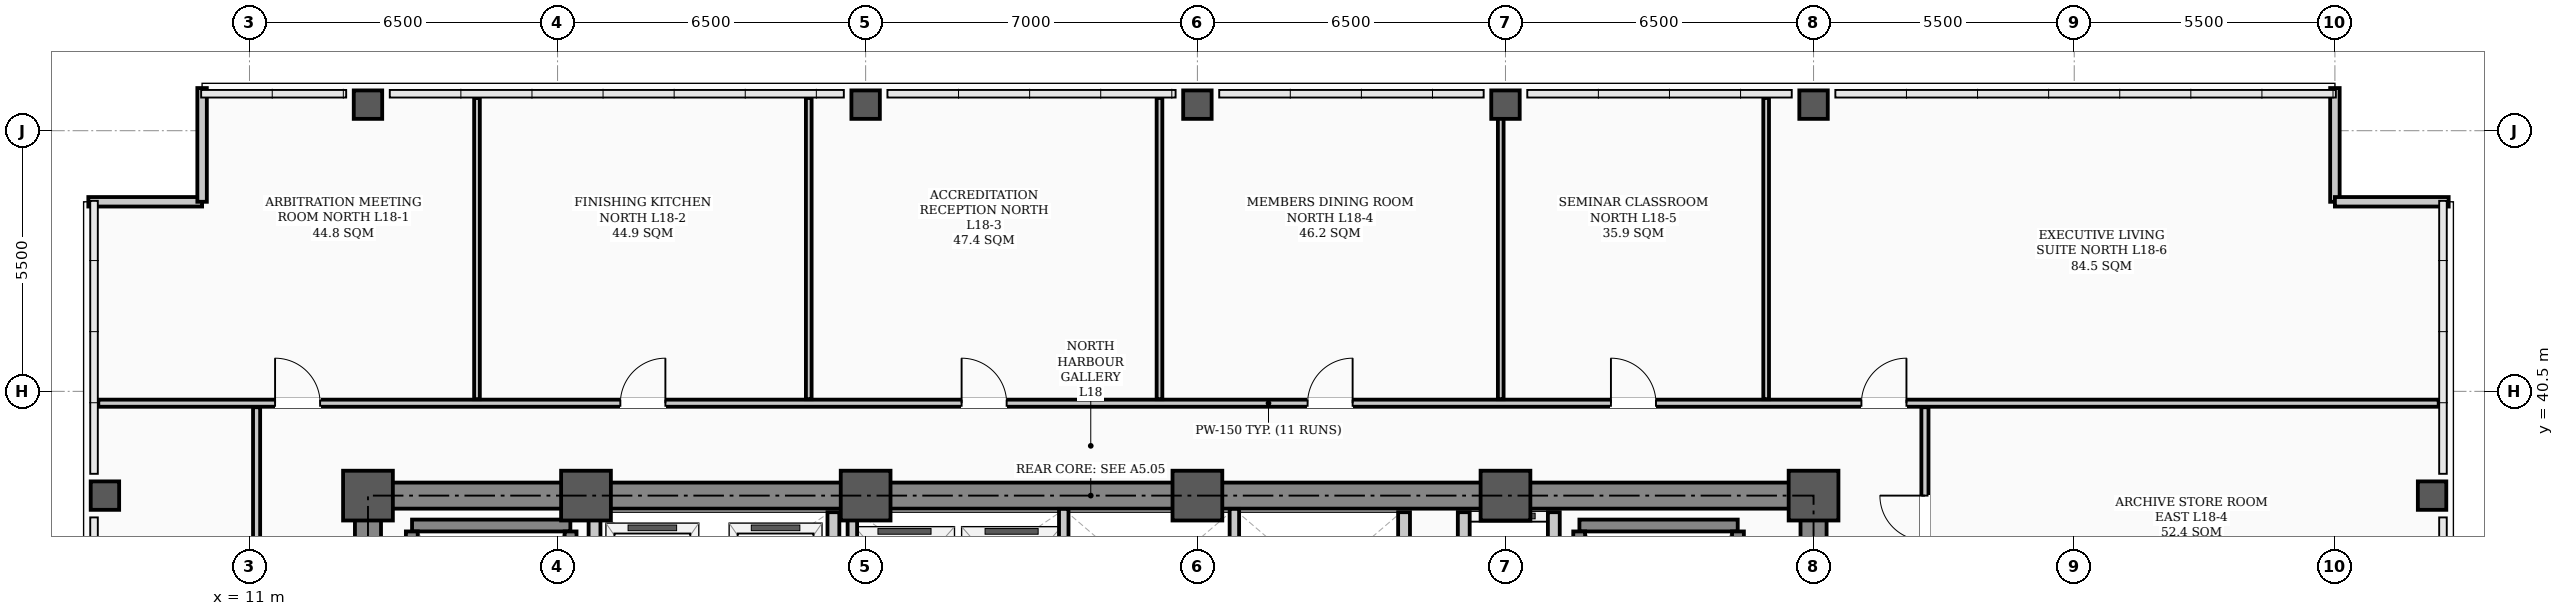
"""IFC4 building model, lengths in metres.
Left out: names, types, materials, properties, quantities, classifications, styles, units other than length and angle.
Written with IfcOpenShell. Run it as: python <this file> out.ifc"""

import sys

from ifc_helpers import new_model, si_unit, direction, frame, frame_2d, origin, origin_2d, place, context, subcontext, project, spatial, rectangle, hollow_rectangle, extrude, element, fill, save


model = new_model("IFC4")
c1 = context("Model", 3, precision=1e-05, world=origin(), true_north=direction((0.0, 1.0)))
c2 = subcontext(c1, "Body", "Model", "MODEL_VIEW")
j1 = project(units=[si_unit("LENGTHUNIT", "METRE"), si_unit("PLANEANGLEUNIT", "RADIAN")], contexts=[c1])
p1 = place(None, origin())
s1 = spatial("IfcSite", under=j1, at=p1, CompositionType="ELEMENT")
p2 = place(p1, origin())
s2 = spatial("IfcBuilding", under=s1, at=p2, CompositionType="ELEMENT")
p3 = place(p2, frame((0.0, 0.0, 73.3)))
s3 = spatial("IfcBuildingStorey", under=s2, at=p3, CompositionType="ELEMENT", Elevation=73.3)
for number, where, z_axis, x_axis in (
    (1, (13.5, 38.3, 0.0), (0.0, 0.0, 1.0), (1.0, 0.0, 0.0)),
    (2, (18.1, 38.3, 0.0), (0.0, 0.0, 1.0), (1.0, 0.0, 0.0)),
    (3, (24.0, 38.3, 0.0), (0.0, 0.0, 1.0), (1.0, 0.0, 0.0)),
    (4, (31.0, 38.3, 0.0), (0.0, 0.0, 1.0), (1.0, 0.0, 0.0)),
    (5, (37.5, 38.3, 0.0), (0.0, 0.0, 1.0), (1.0, 0.0, 0.0)),
    (6, (44.0, 38.3, 0.0), (0.0, 0.0, 1.0), (1.0, 0.0, 0.0)),
):
    element("IfcColumn", number, at=place(p3, frame(where, z_axis=z_axis, x_axis=x_axis)), inside=s3, PredefinedType="COLUMN", context=c2, shape_type="SweptSolid", body=[
        extrude(hollow_rectangle(XDim=1.05, YDim=1.05, WallThickness=0.038, InnerFilletRadius=0.019, OuterFilletRadius=0.057, at=origin_2d()), origin(), (0.0, 0.0, 1.0), 3.9),
    ])
for number, where, z_axis, x_axis in (
    (7, (7.95, 38.3, 0.0), (0.0, 0.0, 1.0), (1.0, 0.0, 0.0)),
    (8, (13.5, 46.55, 0.0), (0.0, 0.0, 1.0), (1.0, 0.0, 0.0)),
    (9, (24.0, 46.55, 0.0), (0.0, 0.0, 1.0), (1.0, 0.0, 0.0)),
    (10, (31.0, 46.55, 0.0), (0.0, 0.0, 1.0), (1.0, 0.0, 0.0)),
    (11, (37.5, 46.55, 0.0), (0.0, 0.0, 1.0), (1.0, 0.0, 0.0)),
    (12, (44.0, 46.55, 0.0), (0.0, 0.0, 1.0), (1.0, 0.0, 0.0)),
    (13, (57.05, 38.3, 0.0), (0.0, 0.0, 1.0), (1.0, 0.0, 0.0)),
):
    element("IfcColumn", number, at=place(p3, frame(where, z_axis=z_axis, x_axis=x_axis)), inside=s3, PredefinedType="COLUMN", context=c2, shape_type="SweptSolid", body=[
        extrude(hollow_rectangle(XDim=0.6, YDim=0.6, WallThickness=0.026, InnerFilletRadius=0.013, OuterFilletRadius=0.039, at=origin_2d()), origin(), (0.0, 0.0, 1.0), 3.9),
    ])
for number, where, z_axis, x_axis in (
    (14, (7.6, 44.5, 0.0), (0.0, 0.0, 1.0), (1.0, 0.0, 0.0)),
    (15, (10.0, 44.5, 0.0), (0.0, 0.0, 1.0), (0.0, 1.0, 0.0)),
    (16, (55.0, 46.9, 0.0), (0.0, 0.0, 1.0), (0.0, -1.0, 0.0)),
    (17, (55.0, 44.5, 0.0), (0.0, 0.0, 1.0), (1.0, 0.0, 0.0)),
):
    element("IfcWall", number, at=place(p3, frame(where, z_axis=z_axis, x_axis=x_axis)), inside=s3, PredefinedType="PARAPET", context=c2, shape_type="SweptSolid", body=[
        extrude(rectangle(XDim=2.4, YDim=0.2, at=frame_2d((1.2, 0.0))), origin(), (0.0, 0.0, 1.0), 1.2),
    ])
p4 = place(p3, frame((13.5, 38.3, 0.0), z_axis=(0.0, 0.0, 1.0), x_axis=(1.0, 0.0, 0.0)))
e18 = element("IfcWall", 18, at=p4, inside=s3, PredefinedType="SHEAR", context=c2, shape_type="SweptSolid", body=[
    extrude(rectangle(XDim=30.5, YDim=0.55, at=frame_2d((15.25, 0.0))), origin(), (0.0, 0.0, 1.0), 3.72),
])
for number, where, z_axis, x_axis in (
    (19, (13.5, 29.35, 0.0), (0.0, 0.0, 1.0), (0.0, 1.0, 0.0)),
    (20, (44.0, 29.35, 0.0), (0.0, 0.0, 1.0), (0.0, 1.0, 0.0)),
):
    element("IfcWall", number, at=place(p3, frame(where, z_axis=z_axis, x_axis=x_axis)), inside=s3, PredefinedType="SHEAR", context=c2, shape_type="SweptSolid", body=[
        extrude(rectangle(XDim=8.6, YDim=0.55, at=frame_2d((4.3, 0.0))), origin(), (0.0, 0.0, 1.0), 3.72),
    ])
p5 = place(p3, frame((14.43, 37.669, 0.0), z_axis=(0.0, 0.0, 1.0), x_axis=(1.0, 0.0, 0.0)))
e21 = element("IfcWall", 21, at=p5, inside=s3, PredefinedType="STANDARD", context=c2, shape_type="SweptSolid", body=[
    extrude(rectangle(XDim=3.34, YDim=0.25, at=frame_2d((1.67, 0.0))), origin(), (0.0, 0.0, 1.0), 3.72),
])
for number, where, z_axis, x_axis in (
    (22, (14.425, 30.36, 0.0), (0.0, 0.0, 1.0), (0.0, 1.0, 0.0)),
    (23, (17.775, 30.36, 0.0), (0.0, 0.0, 1.0), (0.0, 1.0, 0.0)),
):
    element("IfcWall", number, at=place(p3, frame(where, z_axis=z_axis, x_axis=x_axis)), inside=s3, PredefinedType="STANDARD", context=c2, shape_type="SweptSolid", body=[
        extrude(rectangle(XDim=7.184, YDim=0.25, at=frame_2d((3.592, 0.0))), origin(), (0.0, 0.0, 1.0), 3.72),
    ])
p6 = place(p3, frame((39.06, 37.669, 0.0), z_axis=(0.0, 0.0, 1.0), x_axis=(1.0, 0.0, 0.0)))
e24 = element("IfcWall", 24, at=p6, inside=s3, PredefinedType="STANDARD", context=c2, shape_type="SweptSolid", body=[
    extrude(rectangle(XDim=3.34, YDim=0.25, at=frame_2d((1.67, 0.0))), origin(), (0.0, 0.0, 1.0), 3.72),
])
for number, where, z_axis, x_axis in (
    (25, (39.055, 30.36, 0.0), (0.0, 0.0, 1.0), (0.0, 1.0, 0.0)),
    (26, (42.405, 30.36, 0.0), (0.0, 0.0, 1.0), (0.0, 1.0, 0.0)),
):
    element("IfcWall", number, at=place(p3, frame(where, z_axis=z_axis, x_axis=x_axis)), inside=s3, PredefinedType="STANDARD", context=c2, shape_type="SweptSolid", body=[
        extrude(rectangle(XDim=7.184, YDim=0.25, at=frame_2d((3.592, 0.0))), origin(), (0.0, 0.0, 1.0), 3.72),
    ])
p7 = place(p3, frame((36.62, 31.95, 0.0), z_axis=(0.0, 0.0, 1.0), x_axis=(0.0, 1.0, 0.0)))
e27 = element("IfcWall", 27, at=p7, inside=s3, PredefinedType="STANDARD", context=c2, shape_type="SweptSolid", body=[
    extrude(rectangle(XDim=6.0, YDim=0.25, at=frame_2d((3.0, 0.0))), origin(), (0.0, 0.0, 1.0), 3.3),
])
p8 = place(p7, frame((0.9, 0.0, 0.0)))
e28 = element("IfcOpeningElement", 28, at=p8, cuts=e27, PredefinedType="OPENING", context=c2, shape_type="SweptSolid", body=[
    extrude(rectangle(XDim=1.1, YDim=2.08, at=frame_2d((0.55, 1.04))), frame((0.0, 0.135, 0.0), z_axis=(0.0, -1.0, 0.0), x_axis=(1.0, 0.0, 0.0)), (0.0, 0.0, 1.0), 0.27),
])
p9 = place(p7, frame((4.0, 0.0, 0.0)))
e29 = element("IfcOpeningElement", 29, at=p9, cuts=e27, PredefinedType="OPENING", context=c2, shape_type="SweptSolid", body=[
    extrude(rectangle(XDim=1.1, YDim=2.08, at=frame_2d((0.55, 1.04))), frame((0.0, 0.135, 0.0), z_axis=(0.0, -1.0, 0.0), x_axis=(1.0, 0.0, 0.0)), (0.0, 0.0, 1.0), 0.27),
])
p10 = place(p3, frame((38.52, 31.95, 0.0), z_axis=(0.0, 0.0, 1.0), x_axis=(0.0, 1.0, 0.0)))
e30 = element("IfcWall", 30, at=p10, inside=s3, PredefinedType="STANDARD", context=c2, shape_type="SweptSolid", body=[
    extrude(rectangle(XDim=6.0, YDim=0.25, at=frame_2d((3.0, 0.0))), origin(), (0.0, 0.0, 1.0), 3.3),
])
for number, where, z_axis, x_axis in (
    (31, (18.28, 34.62, 0.0), (0.0, 0.0, 1.0), (0.0, 1.0, 0.0)),
    (32, (23.32, 34.62, 0.0), (0.0, 0.0, 1.0), (0.0, 1.0, 0.0)),
):
    element("IfcWall", number, at=place(p3, frame(where, z_axis=z_axis, x_axis=x_axis)), inside=s3, PredefinedType="STANDARD", context=c2, shape_type="SweptSolid", body=[
        extrude(rectangle(XDim=3.33, YDim=0.25, at=frame_2d((1.665, 0.0))), origin(), (0.0, 0.0, 1.0), 3.3),
    ])
p11 = place(p3, frame((35.36, 34.9, 0.0), z_axis=(0.0, 0.0, 1.0), x_axis=(0.0, 1.0, 0.0)))
e33 = element("IfcWall", 33, at=p11, inside=s3, PredefinedType="STANDARD", context=c2, shape_type="SweptSolid", body=[
    extrude(rectangle(XDim=3.05, YDim=0.25, at=frame_2d((1.525, 0.0))), origin(), (0.0, 0.0, 1.0), 3.3),
])
p12 = place(p3, frame((7.81, 40.25, 0.0), z_axis=(0.0, 0.0, 1.0), x_axis=(1.0, 0.0, 0.0)))
e34 = element("IfcWall", 34, at=p12, inside=s3, PredefinedType="PARTITIONING", context=c2, shape_type="SweptSolid", body=[
    extrude(rectangle(XDim=49.38, YDim=0.15, at=frame_2d((24.69, 0.0))), origin(), (0.0, 0.0, 1.0), 3.1),
])
p13 = place(p12, frame((3.73, 0.0, 0.0)))
e35 = element("IfcOpeningElement", 35, at=p13, cuts=e34, PredefinedType="OPENING", context=c2, shape_type="SweptSolid", body=[
    extrude(rectangle(XDim=0.95, YDim=2.08, at=frame_2d((0.475, 1.04))), frame((0.0, 0.085, 0.0), z_axis=(0.0, -1.0, 0.0), x_axis=(1.0, 0.0, 0.0)), (0.0, 0.0, 1.0), 0.17),
])
p14 = place(p12, frame((11.015, 0.0, 0.0)))
e36 = element("IfcOpeningElement", 36, at=p14, cuts=e34, PredefinedType="OPENING", context=c2, shape_type="SweptSolid", body=[
    extrude(rectangle(XDim=0.95, YDim=2.08, at=frame_2d((0.475, 1.04))), frame((0.0, 0.085, 0.0), z_axis=(0.0, -1.0, 0.0), x_axis=(1.0, 0.0, 0.0)), (0.0, 0.0, 1.0), 0.17),
])
p15 = place(p12, frame((18.215, 0.0, 0.0)))
e37 = element("IfcOpeningElement", 37, at=p15, cuts=e34, PredefinedType="OPENING", context=c2, shape_type="SweptSolid", body=[
    extrude(rectangle(XDim=0.95, YDim=2.08, at=frame_2d((0.475, 1.04))), frame((0.0, 0.085, 0.0), z_axis=(0.0, -1.0, 0.0), x_axis=(1.0, 0.0, 0.0)), (0.0, 0.0, 1.0), 0.17),
])
p16 = place(p12, frame((25.515, 0.0, 0.0)))
e38 = element("IfcOpeningElement", 38, at=p16, cuts=e34, PredefinedType="OPENING", context=c2, shape_type="SweptSolid", body=[
    extrude(rectangle(XDim=0.95, YDim=2.08, at=frame_2d((0.475, 1.04))), frame((0.0, 0.085, 0.0), z_axis=(0.0, -1.0, 0.0), x_axis=(1.0, 0.0, 0.0)), (0.0, 0.0, 1.0), 0.17),
])
p17 = place(p12, frame((31.915, 0.0, 0.0)))
e39 = element("IfcOpeningElement", 39, at=p17, cuts=e34, PredefinedType="OPENING", context=c2, shape_type="SweptSolid", body=[
    extrude(rectangle(XDim=0.95, YDim=2.08, at=frame_2d((0.475, 1.04))), frame((0.0, 0.085, 0.0), z_axis=(0.0, -1.0, 0.0), x_axis=(1.0, 0.0, 0.0)), (0.0, 0.0, 1.0), 0.17),
])
p18 = place(p12, frame((37.2, 0.0, 0.0)))
e40 = element("IfcOpeningElement", 40, at=p18, cuts=e34, PredefinedType="OPENING", context=c2, shape_type="SweptSolid", body=[
    extrude(rectangle(XDim=0.95, YDim=2.08, at=frame_2d((0.475, 1.04))), frame((0.0, 0.085, 0.0), z_axis=(0.0, -1.0, 0.0), x_axis=(1.0, 0.0, 0.0)), (0.0, 0.0, 1.0), 0.17),
])
p19 = place(p3, frame((11.15, 17.635, 0.0), z_axis=(0.0, 0.0, 1.0), x_axis=(0.0, 1.0, 0.0)))
e41 = element("IfcWall", 41, at=p19, inside=s3, PredefinedType="PARTITIONING", context=c2, shape_type="SweptSolid", body=[
    extrude(rectangle(XDim=22.53, YDim=0.15, at=frame_2d((11.265, 0.0))), origin(), (0.0, 0.0, 1.0), 3.0),
])
p20 = place(p19, frame((0.64, 0.0, 0.0)))
e42 = element("IfcOpeningElement", 42, at=p20, cuts=e41, PredefinedType="OPENING", context=c2, shape_type="SweptSolid", body=[
    extrude(rectangle(XDim=0.95, YDim=2.08, at=frame_2d((0.475, 1.04))), frame((0.0, 0.085, 0.0), z_axis=(0.0, -1.0, 0.0), x_axis=(1.0, 0.0, 0.0)), (0.0, 0.0, 1.0), 0.17),
])
p21 = place(p3, frame((46.35, 17.635, 0.0), z_axis=(0.0, 0.0, 1.0), x_axis=(0.0, 1.0, 0.0)))
e43 = element("IfcWall", 43, at=p21, inside=s3, PredefinedType="PARTITIONING", context=c2, shape_type="SweptSolid", body=[
    extrude(rectangle(XDim=22.53, YDim=0.15, at=frame_2d((11.265, 0.0))), origin(), (0.0, 0.0, 1.0), 3.0),
])
p22 = place(p21, frame((3.065, 0.0, 0.0)))
e44 = element("IfcOpeningElement", 44, at=p22, cuts=e43, PredefinedType="OPENING", context=c2, shape_type="SweptSolid", body=[
    extrude(rectangle(XDim=0.95, YDim=2.08, at=frame_2d((0.475, 1.04))), frame((0.0, 0.085, 0.0), z_axis=(0.0, -1.0, 0.0), x_axis=(1.0, 0.0, 0.0)), (0.0, 0.0, 1.0), 0.17),
])
p23 = place(p21, frame((9.39, 0.0, 0.0)))
e45 = element("IfcOpeningElement", 45, at=p23, cuts=e43, PredefinedType="OPENING", context=c2, shape_type="SweptSolid", body=[
    extrude(rectangle(XDim=0.95, YDim=2.08, at=frame_2d((0.475, 1.04))), frame((0.0, 0.085, 0.0), z_axis=(0.0, -1.0, 0.0), x_axis=(1.0, 0.0, 0.0)), (0.0, 0.0, 1.0), 0.17),
])
p24 = place(p21, frame((14.69, 0.0, 0.0)))
e46 = element("IfcOpeningElement", 46, at=p24, cuts=e43, PredefinedType="OPENING", context=c2, shape_type="SweptSolid", body=[
    extrude(rectangle(XDim=0.95, YDim=2.08, at=frame_2d((0.475, 1.04))), frame((0.0, 0.085, 0.0), z_axis=(0.0, -1.0, 0.0), x_axis=(1.0, 0.0, 0.0)), (0.0, 0.0, 1.0), 0.17),
])
p25 = place(p21, frame((19.715, 0.0, 0.0)))
e47 = element("IfcOpeningElement", 47, at=p25, cuts=e43, PredefinedType="OPENING", context=c2, shape_type="SweptSolid", body=[
    extrude(rectangle(XDim=0.95, YDim=2.08, at=frame_2d((0.475, 1.04))), frame((0.0, 0.085, 0.0), z_axis=(0.0, -1.0, 0.0), x_axis=(1.0, 0.0, 0.0)), (0.0, 0.0, 1.0), 0.17),
])
for number, where, z_axis, x_axis in (
    (48, (15.8, 40.335, 0.0), (0.0, 0.0, 1.0), (0.0, 1.0, 0.0)),
    (49, (22.8, 40.335, 0.0), (0.0, 0.0, 1.0), (0.0, 1.0, 0.0)),
    (50, (30.2, 40.335, 0.0), (0.0, 0.0, 1.0), (0.0, 1.0, 0.0)),
):
    element("IfcWall", number, at=place(p3, frame(where, z_axis=z_axis, x_axis=x_axis)), inside=s3, PredefinedType="PARTITIONING", context=c2, shape_type="SweptSolid", body=[
        extrude(rectangle(XDim=6.355, YDim=0.12, at=frame_2d((3.177, 0.0))), origin(), (0.0, 0.0, 1.0), 3.212),
    ])
p26 = place(p3, frame((37.4, 40.335, 0.0), z_axis=(0.0, 0.0, 1.0), x_axis=(0.0, 1.0, 0.0)))
e51 = element("IfcWall", 51, at=p26, inside=s3, PredefinedType="PARTITIONING", context=c2, shape_type="SweptSolid", body=[
    extrude(rectangle(XDim=6.355, YDim=0.12, at=frame_2d((3.177, 0.0))), origin(), (0.0, 0.0, 1.0), 3.1),
])
p27 = place(p3, frame((43.0, 40.335, 0.0), z_axis=(0.0, 0.0, 1.0), x_axis=(0.0, 1.0, 0.0)))
e52 = element("IfcWall", 52, at=p27, inside=s3, PredefinedType="PARTITIONING", context=c2, shape_type="SweptSolid", body=[
    extrude(rectangle(XDim=6.355, YDim=0.12, at=frame_2d((3.177, 0.0))), origin(), (0.0, 0.0, 1.0), 3.212),
])
p28 = place(p3, frame((23.72, 34.9, 0.0), z_axis=(0.0, 0.0, 1.0), x_axis=(0.0, 1.0, 0.0)))
e53 = element("IfcWall", 53, at=p28, inside=s3, PredefinedType="STANDARD", context=c2, shape_type="SweptSolid", body=[
    extrude(rectangle(XDim=3.12, YDim=0.2, at=frame_2d((1.56, 0.0))), origin(), (0.0, 0.0, 1.0), 3.1),
])
for number, where, z_axis, x_axis in (
    (54, (28.18, 34.9, 0.0), (0.0, 0.0, 1.0), (0.0, 1.0, 0.0)),
    (55, (31.78, 34.9, 0.0), (0.0, 0.0, 1.0), (0.0, 1.0, 0.0)),
):
    element("IfcWall", number, at=place(p3, frame(where, z_axis=z_axis, x_axis=x_axis)), inside=s3, PredefinedType="STANDARD", context=c2, shape_type="SweptSolid", body=[
        extrude(rectangle(XDim=3.12, YDim=0.2, at=frame_2d((1.56, 0.0))), origin(), (0.0, 0.0, 1.0), 3.3),
    ])
p29 = place(p25, origin())
e56 = element("IfcDoor", 56, at=p29, inside=s3, OperationType="SINGLE_SWING_RIGHT", PredefinedType="DOOR", context=c2, shape_type="SweptSolid", body=[
    extrude(rectangle(XDim=0.95, YDim=2.08, at=frame_2d((0.475, 1.04))), frame((0.0, 0.025, 0.0), z_axis=(0.0, -1.0, 0.0), x_axis=(1.0, 0.0, 0.0)), (0.0, 0.0, 1.0), 0.05),
])
fill(e47, e56)
p30 = place(p13, origin())
e57 = element("IfcDoor", 57, at=p30, inside=s3, OperationType="SINGLE_SWING_LEFT", PredefinedType="DOOR", context=c2, shape_type="SweptSolid", body=[
    extrude(rectangle(XDim=0.95, YDim=2.08, at=frame_2d((0.475, 1.04))), frame((0.0, 0.025, 0.0), z_axis=(0.0, -1.0, 0.0), x_axis=(1.0, 0.0, 0.0)), (0.0, 0.0, 1.0), 0.05),
])
fill(e35, e57)
p31 = place(p14, origin())
e58 = element("IfcDoor", 58, at=p31, inside=s3, OperationType="SINGLE_SWING_RIGHT", PredefinedType="DOOR", context=c2, shape_type="SweptSolid", body=[
    extrude(rectangle(XDim=0.95, YDim=2.08, at=frame_2d((0.475, 1.04))), frame((0.0, 0.025, 0.0), z_axis=(0.0, -1.0, 0.0), x_axis=(1.0, 0.0, 0.0)), (0.0, 0.0, 1.0), 0.05),
])
fill(e36, e58)
p32 = place(p15, origin())
e59 = element("IfcDoor", 59, at=p32, inside=s3, OperationType="SINGLE_SWING_LEFT", PredefinedType="DOOR", context=c2, shape_type="SweptSolid", body=[
    extrude(rectangle(XDim=0.95, YDim=2.08, at=frame_2d((0.475, 1.04))), frame((0.0, 0.025, 0.0), z_axis=(0.0, -1.0, 0.0), x_axis=(1.0, 0.0, 0.0)), (0.0, 0.0, 1.0), 0.05),
])
fill(e37, e59)
p33 = place(p16, origin())
e60 = element("IfcDoor", 60, at=p33, inside=s3, OperationType="SINGLE_SWING_RIGHT", PredefinedType="DOOR", context=c2, shape_type="SweptSolid", body=[
    extrude(rectangle(XDim=0.95, YDim=2.08, at=frame_2d((0.475, 1.04))), frame((0.0, 0.025, 0.0), z_axis=(0.0, -1.0, 0.0), x_axis=(1.0, 0.0, 0.0)), (0.0, 0.0, 1.0), 0.05),
])
fill(e38, e60)
p34 = place(p17, origin())
e61 = element("IfcDoor", 61, at=p34, inside=s3, OperationType="SINGLE_SWING_LEFT", PredefinedType="DOOR", context=c2, shape_type="SweptSolid", body=[
    extrude(rectangle(XDim=0.95, YDim=2.08, at=frame_2d((0.475, 1.04))), frame((0.0, 0.025, 0.0), z_axis=(0.0, -1.0, 0.0), x_axis=(1.0, 0.0, 0.0)), (0.0, 0.0, 1.0), 0.05),
])
fill(e39, e61)
p35 = place(p18, origin())
e62 = element("IfcDoor", 62, at=p35, inside=s3, OperationType="SINGLE_SWING_RIGHT", PredefinedType="DOOR", context=c2, shape_type="SweptSolid", body=[
    extrude(rectangle(XDim=0.95, YDim=2.08, at=frame_2d((0.475, 1.04))), frame((0.0, 0.025, 0.0), z_axis=(0.0, -1.0, 0.0), x_axis=(1.0, 0.0, 0.0)), (0.0, 0.0, 1.0), 0.05),
])
fill(e40, e62)
save(model, sys.argv[1])
